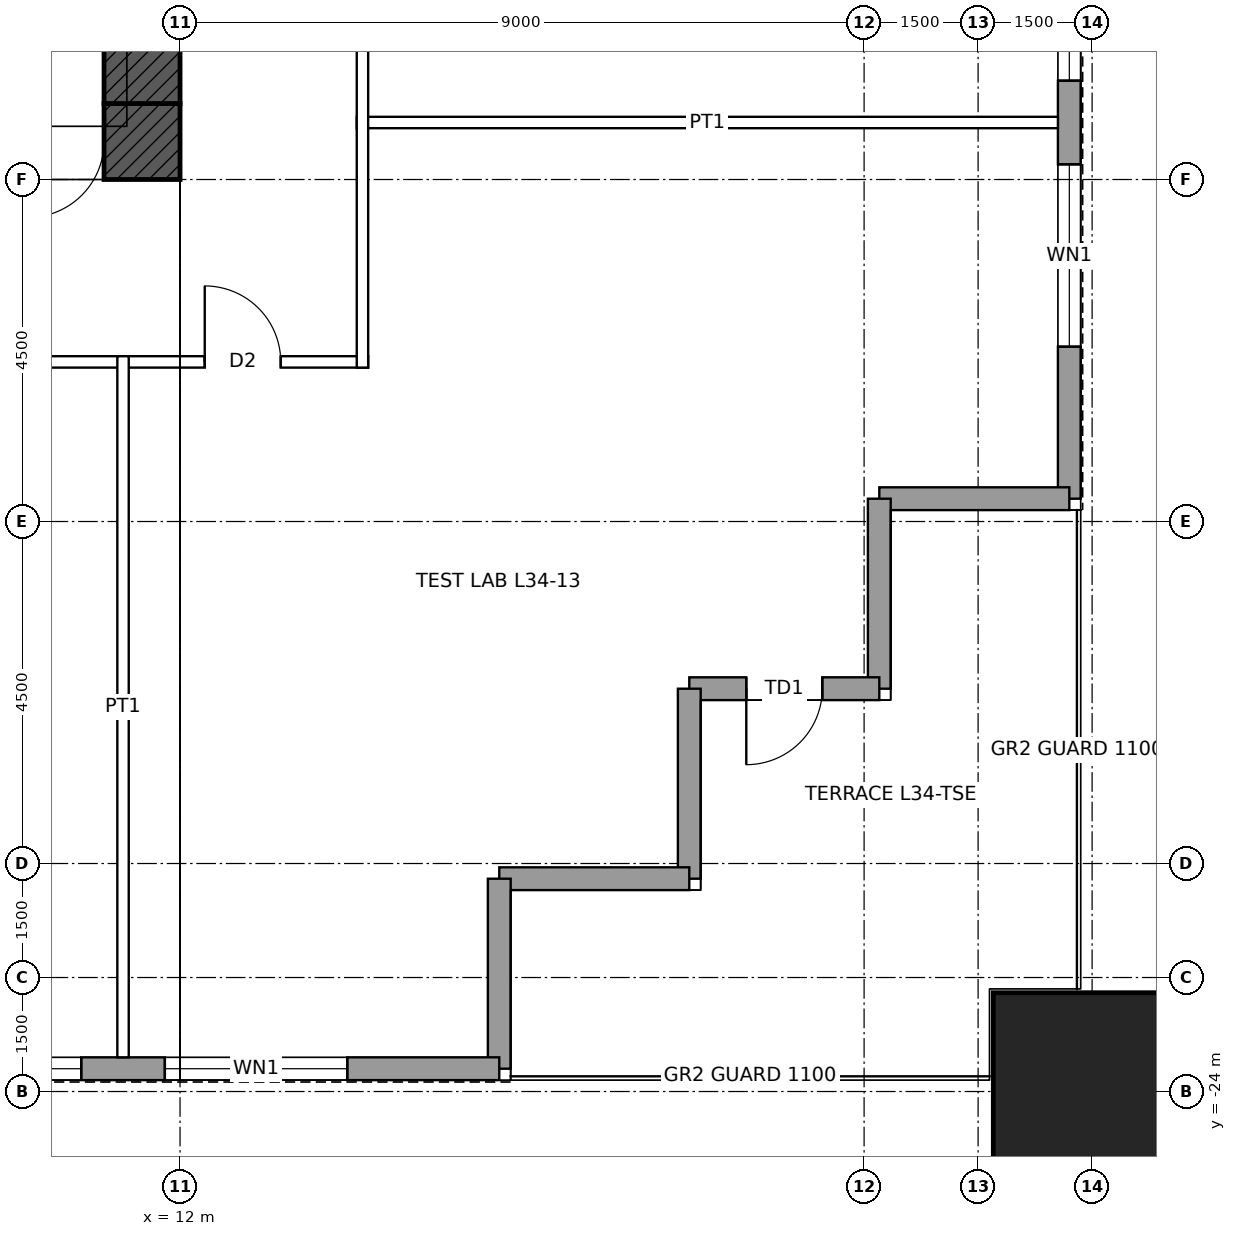
"""IFC4 building model, lengths in metres.
Left out: names, types, materials, properties, quantities, classifications, styles, units other than length and angle.
Written with IfcOpenShell. Run it as: python <this file> out.ifc"""

import sys

from ifc_helpers import new_model, si_unit, direction, frame, frame_2d, origin, origin_2d, place, context, subcontext, project, spatial, rectangle, hollow_rectangle, extrude, element, fill, save


model = new_model("IFC4")
c1 = context("Model", 3, precision=1e-05, world=origin(), true_north=direction((0.0, 1.0)))
c2 = subcontext(c1, "Body", "Model", "MODEL_VIEW")
j1 = project(units=[si_unit("LENGTHUNIT", "METRE"), si_unit("PLANEANGLEUNIT", "RADIAN")], contexts=[c1])
p1 = place(None, origin())
s1 = spatial("IfcSite", under=j1, at=p1, CompositionType="ELEMENT")
p2 = place(p1, origin())
s2 = spatial("IfcBuilding", under=s1, at=p2, CompositionType="ELEMENT")
p3 = place(p2, frame((0.0, 0.0, 167.4)))
s3 = spatial("IfcBuildingStorey", under=s2, at=p3, CompositionType="ELEMENT", Elevation=167.4)
p4 = place(p3, frame((24.0, -24.0, 0.0), z_axis=(0.0, 0.0, 1.0), x_axis=(1.0, 0.0, 0.0)))
e1 = element("IfcColumn", 1, at=p4, inside=s3, PredefinedType="COLUMN", context=c2, shape_type="SweptSolid", body=[
    extrude(hollow_rectangle(XDim=2.6, YDim=2.6, WallThickness=0.13, at=origin_2d()), origin(), (0.0, 0.0, 1.0), 4.5),
])
p5 = place(p3, frame((12.0, -11.5, 0.0), z_axis=(0.0, 0.0, 1.0), x_axis=(-1.0, 0.0, 0.0)))
e2 = element("IfcWall", 2, at=p5, inside=s3, PredefinedType="SHEAR", context=c2, shape_type="SweptSolid", body=[
    extrude(rectangle(XDim=24.0, YDim=1.0, at=frame_2d((12.0, 0.0))), origin(), (0.0, 0.0, 1.0), 4.5),
])
p6 = place(p5, frame((11.5, 0.0, 0.0)))
e3 = element("IfcOpeningElement", 3, at=p6, cuts=e2, PredefinedType="OPENING", context=c2, shape_type="SweptSolid", body=[
    extrude(rectangle(XDim=1.0, YDim=2.1, at=frame_2d((0.5, 1.05))), frame((0.0, 0.51, 0.0), z_axis=(0.0, -1.0, 0.0), x_axis=(1.0, 0.0, 0.0)), (0.0, 0.0, 1.0), 1.02),
])
p7 = place(p5, frame((1.0, 0.0, 0.0)))
e4 = element("IfcOpeningElement", 4, at=p7, cuts=e2, PredefinedType="OPENING", context=c2, shape_type="SweptSolid", body=[
    extrude(rectangle(XDim=1.0, YDim=2.4, at=frame_2d((0.5, 1.2))), frame((0.0, 0.51, 0.0), z_axis=(0.0, -1.0, 0.0), x_axis=(1.0, 0.0, 0.0)), (0.0, 0.0, 1.0), 1.02),
])
p8 = place(p3, frame((11.5, 11.0, 0.0), z_axis=(0.0, 0.0, 1.0), x_axis=(0.0, -1.0, 0.0)))
e5 = element("IfcWall", 5, at=p8, inside=s3, PredefinedType="SHEAR", context=c2, shape_type="SweptSolid", body=[
    extrude(rectangle(XDim=22.0, YDim=1.0, at=frame_2d((11.0, 0.0))), origin(), (0.0, 0.0, 1.0), 4.5),
])
p9 = place(p8, frame((10.5, 0.0, 0.0)))
e6 = element("IfcOpeningElement", 6, at=p9, cuts=e5, PredefinedType="OPENING", context=c2, shape_type="SweptSolid", body=[
    extrude(rectangle(XDim=1.0, YDim=2.4, at=frame_2d((0.5, 1.2))), frame((0.0, 0.51, 0.0), z_axis=(0.0, -1.0, 0.0), x_axis=(1.0, 0.0, 0.0)), (0.0, 0.0, 1.0), 1.02),
])
p10 = place(p3, frame((23.7, 16.2, 0.0), z_axis=(0.0, 0.0, 1.0), x_axis=(0.0, -1.0, 0.0)))
e7 = element("IfcWall", 7, at=p10, inside=s3, PredefinedType="SOLIDWALL", context=c2, shape_type="SweptSolid", body=[
    extrude(rectangle(XDim=32.4, YDim=0.3, at=frame_2d((16.2, 0.0))), origin(), (0.0, 0.0, 1.0), 4.25),
])
p11 = place(p10, frame((2.0, 0.0, 1.0)))
e8 = element("IfcOpeningElement", 8, at=p11, cuts=e7, PredefinedType="OPENING", context=c2, shape_type="SweptSolid", body=[
    extrude(rectangle(XDim=2.4, YDim=1.2, at=frame_2d((1.2, 0.6))), frame((0.0, 0.16, 0.0), z_axis=(0.0, -1.0, 0.0), x_axis=(1.0, 0.0, 0.0)), (0.0, 0.0, 1.0), 0.32),
])
p12 = place(p10, frame((5.5, 0.0, 1.0)))
e9 = element("IfcOpeningElement", 9, at=p12, cuts=e7, PredefinedType="OPENING", context=c2, shape_type="SweptSolid", body=[
    extrude(rectangle(XDim=2.4, YDim=1.2, at=frame_2d((1.2, 0.6))), frame((0.0, 0.16, 0.0), z_axis=(0.0, -1.0, 0.0), x_axis=(1.0, 0.0, 0.0)), (0.0, 0.0, 1.0), 0.32),
])
p13 = place(p10, frame((9.5, 0.0, 1.0)))
e10 = element("IfcOpeningElement", 10, at=p13, cuts=e7, PredefinedType="OPENING", context=c2, shape_type="SweptSolid", body=[
    extrude(rectangle(XDim=2.4, YDim=1.2, at=frame_2d((1.2, 0.6))), frame((0.0, 0.16, 0.0), z_axis=(0.0, -1.0, 0.0), x_axis=(1.0, 0.0, 0.0)), (0.0, 0.0, 1.0), 0.32),
])
p14 = place(p10, frame((13.0, 0.0, 1.0)))
e11 = element("IfcOpeningElement", 11, at=p14, cuts=e7, PredefinedType="OPENING", context=c2, shape_type="SweptSolid", body=[
    extrude(rectangle(XDim=2.4, YDim=1.2, at=frame_2d((1.2, 0.6))), frame((0.0, 0.16, 0.0), z_axis=(0.0, -1.0, 0.0), x_axis=(1.0, 0.0, 0.0)), (0.0, 0.0, 1.0), 0.32),
])
p15 = place(p10, frame((17.0, 0.0, 1.0)))
e12 = element("IfcOpeningElement", 12, at=p15, cuts=e7, PredefinedType="OPENING", context=c2, shape_type="SweptSolid", body=[
    extrude(rectangle(XDim=2.4, YDim=1.2, at=frame_2d((1.2, 0.6))), frame((0.0, 0.16, 0.0), z_axis=(0.0, -1.0, 0.0), x_axis=(1.0, 0.0, 0.0)), (0.0, 0.0, 1.0), 0.32),
])
p16 = place(p10, frame((20.5, 0.0, 1.0)))
e13 = element("IfcOpeningElement", 13, at=p16, cuts=e7, PredefinedType="OPENING", context=c2, shape_type="SweptSolid", body=[
    extrude(rectangle(XDim=2.4, YDim=1.2, at=frame_2d((1.2, 0.6))), frame((0.0, 0.16, 0.0), z_axis=(0.0, -1.0, 0.0), x_axis=(1.0, 0.0, 0.0)), (0.0, 0.0, 1.0), 0.32),
])
p17 = place(p10, frame((24.5, 0.0, 1.0)))
e14 = element("IfcOpeningElement", 14, at=p17, cuts=e7, PredefinedType="OPENING", context=c2, shape_type="SweptSolid", body=[
    extrude(rectangle(XDim=2.4, YDim=1.2, at=frame_2d((1.2, 0.6))), frame((0.0, 0.16, 0.0), z_axis=(0.0, -1.0, 0.0), x_axis=(1.0, 0.0, 0.0)), (0.0, 0.0, 1.0), 0.32),
])
p18 = place(p10, frame((28.0, 0.0, 1.0)))
e15 = element("IfcOpeningElement", 15, at=p18, cuts=e7, PredefinedType="OPENING", context=c2, shape_type="SweptSolid", body=[
    extrude(rectangle(XDim=2.4, YDim=1.2, at=frame_2d((1.2, 0.6))), frame((0.0, 0.16, 0.0), z_axis=(0.0, -1.0, 0.0), x_axis=(1.0, 0.0, 0.0)), (0.0, 0.0, 1.0), 0.32),
])
for number, where, z_axis, x_axis in (
    (16, (23.7, -16.2, 0.0), (0.0, 0.0, 1.0), (-1.0, 0.0, 0.0)),
    (17, (21.2, -16.2, 0.0), (0.0, 0.0, 1.0), (0.0, -1.0, 0.0)),
):
    element("IfcWall", number, at=place(p3, frame(where, z_axis=z_axis, x_axis=x_axis)), inside=s3, PredefinedType="SOLIDWALL", context=c2, shape_type="SweptSolid", body=[
        extrude(rectangle(XDim=2.5, YDim=0.3, at=frame_2d((1.25, 0.0))), origin(), (0.0, 0.0, 1.0), 4.25),
    ])
p19 = place(p3, frame((21.2, -18.7, 0.0), z_axis=(0.0, 0.0, 1.0), x_axis=(-1.0, 0.0, 0.0)))
e18 = element("IfcWall", 18, at=p19, inside=s3, PredefinedType="SOLIDWALL", context=c2, shape_type="SweptSolid", body=[
    extrude(rectangle(XDim=2.5, YDim=0.3, at=frame_2d((1.25, 0.0))), origin(), (0.0, 0.0, 1.0), 4.25),
])
p20 = place(p19, frame((0.75, 0.0, 0.0)))
e19 = element("IfcOpeningElement", 19, at=p20, cuts=e18, PredefinedType="OPENING", context=c2, shape_type="SweptSolid", body=[
    extrude(rectangle(XDim=1.0, YDim=2.4, at=frame_2d((0.5, 1.2))), frame((0.0, 0.16, 0.0), z_axis=(0.0, -1.0, 0.0), x_axis=(1.0, 0.0, 0.0)), (0.0, 0.0, 1.0), 0.32),
])
for number, where, z_axis, x_axis in (
    (20, (18.7, -18.7, 0.0), (0.0, 0.0, 1.0), (0.0, -1.0, 0.0)),
    (21, (18.7, -21.2, 0.0), (0.0, 0.0, 1.0), (-1.0, 0.0, 0.0)),
    (22, (16.2, -21.2, 0.0), (0.0, 0.0, 1.0), (0.0, -1.0, 0.0)),
):
    element("IfcWall", number, at=place(p3, frame(where, z_axis=z_axis, x_axis=x_axis)), inside=s3, PredefinedType="SOLIDWALL", context=c2, shape_type="SweptSolid", body=[
        extrude(rectangle(XDim=2.5, YDim=0.3, at=frame_2d((1.25, 0.0))), origin(), (0.0, 0.0, 1.0), 4.25),
    ])
p21 = place(p3, frame((16.2, -23.7, 0.0), z_axis=(0.0, 0.0, 1.0), x_axis=(-1.0, 0.0, 0.0)))
e23 = element("IfcWall", 23, at=p21, inside=s3, PredefinedType="SOLIDWALL", context=c2, shape_type="SweptSolid", body=[
    extrude(rectangle(XDim=32.4, YDim=0.3, at=frame_2d((16.2, 0.0))), origin(), (0.0, 0.0, 1.0), 4.25),
])
p22 = place(p21, frame((2.0, 0.0, 1.0)))
e24 = element("IfcOpeningElement", 24, at=p22, cuts=e23, PredefinedType="OPENING", context=c2, shape_type="SweptSolid", body=[
    extrude(rectangle(XDim=2.4, YDim=1.2, at=frame_2d((1.2, 0.6))), frame((0.0, 0.16, 0.0), z_axis=(0.0, -1.0, 0.0), x_axis=(1.0, 0.0, 0.0)), (0.0, 0.0, 1.0), 0.32),
])
p23 = place(p21, frame((5.5, 0.0, 1.0)))
e25 = element("IfcOpeningElement", 25, at=p23, cuts=e23, PredefinedType="OPENING", context=c2, shape_type="SweptSolid", body=[
    extrude(rectangle(XDim=2.4, YDim=1.2, at=frame_2d((1.2, 0.6))), frame((0.0, 0.16, 0.0), z_axis=(0.0, -1.0, 0.0), x_axis=(1.0, 0.0, 0.0)), (0.0, 0.0, 1.0), 0.32),
])
p24 = place(p21, frame((9.5, 0.0, 1.0)))
e26 = element("IfcOpeningElement", 26, at=p24, cuts=e23, PredefinedType="OPENING", context=c2, shape_type="SweptSolid", body=[
    extrude(rectangle(XDim=2.4, YDim=1.2, at=frame_2d((1.2, 0.6))), frame((0.0, 0.16, 0.0), z_axis=(0.0, -1.0, 0.0), x_axis=(1.0, 0.0, 0.0)), (0.0, 0.0, 1.0), 0.32),
])
p25 = place(p21, frame((13.0, 0.0, 1.0)))
e27 = element("IfcOpeningElement", 27, at=p25, cuts=e23, PredefinedType="OPENING", context=c2, shape_type="SweptSolid", body=[
    extrude(rectangle(XDim=2.4, YDim=1.2, at=frame_2d((1.2, 0.6))), frame((0.0, 0.16, 0.0), z_axis=(0.0, -1.0, 0.0), x_axis=(1.0, 0.0, 0.0)), (0.0, 0.0, 1.0), 0.32),
])
p26 = place(p21, frame((17.0, 0.0, 1.0)))
e28 = element("IfcOpeningElement", 28, at=p26, cuts=e23, PredefinedType="OPENING", context=c2, shape_type="SweptSolid", body=[
    extrude(rectangle(XDim=2.4, YDim=1.2, at=frame_2d((1.2, 0.6))), frame((0.0, 0.16, 0.0), z_axis=(0.0, -1.0, 0.0), x_axis=(1.0, 0.0, 0.0)), (0.0, 0.0, 1.0), 0.32),
])
p27 = place(p21, frame((20.5, 0.0, 1.0)))
e29 = element("IfcOpeningElement", 29, at=p27, cuts=e23, PredefinedType="OPENING", context=c2, shape_type="SweptSolid", body=[
    extrude(rectangle(XDim=2.4, YDim=1.2, at=frame_2d((1.2, 0.6))), frame((0.0, 0.16, 0.0), z_axis=(0.0, -1.0, 0.0), x_axis=(1.0, 0.0, 0.0)), (0.0, 0.0, 1.0), 0.32),
])
p28 = place(p21, frame((24.5, 0.0, 1.0)))
e30 = element("IfcOpeningElement", 30, at=p28, cuts=e23, PredefinedType="OPENING", context=c2, shape_type="SweptSolid", body=[
    extrude(rectangle(XDim=2.4, YDim=1.2, at=frame_2d((1.2, 0.6))), frame((0.0, 0.16, 0.0), z_axis=(0.0, -1.0, 0.0), x_axis=(1.0, 0.0, 0.0)), (0.0, 0.0, 1.0), 0.32),
])
p29 = place(p21, frame((28.0, 0.0, 1.0)))
e31 = element("IfcOpeningElement", 31, at=p29, cuts=e23, PredefinedType="OPENING", context=c2, shape_type="SweptSolid", body=[
    extrude(rectangle(XDim=2.4, YDim=1.2, at=frame_2d((1.2, 0.6))), frame((0.0, 0.16, 0.0), z_axis=(0.0, -1.0, 0.0), x_axis=(1.0, 0.0, 0.0)), (0.0, 0.0, 1.0), 0.32),
])
p30 = place(p3, frame((-14.475, -14.4, 0.0), z_axis=(0.0, 0.0, 1.0), x_axis=(1.0, 0.0, 0.0)))
e32 = element("IfcWall", 32, at=p30, inside=s3, PredefinedType="PARTITIONING", context=c2, shape_type="SweptSolid", body=[
    extrude(rectangle(XDim=28.95, YDim=0.15, at=frame_2d((14.475, 0.0))), origin(), (0.0, 0.0, 1.0), 4.25),
])
p31 = place(p30, frame((21.075, 0.0, 0.0)))
e33 = element("IfcOpeningElement", 33, at=p31, cuts=e32, PredefinedType="OPENING", context=c2, shape_type="SweptSolid", body=[
    extrude(rectangle(XDim=1.8, YDim=2.4, at=frame_2d((0.9, 1.2))), frame((0.0, 0.085, 0.0), z_axis=(0.0, -1.0, 0.0), x_axis=(1.0, 0.0, 0.0)), (0.0, 0.0, 1.0), 0.17),
])
p32 = place(p30, frame((9.825, 0.0, 0.0)))
e34 = element("IfcOpeningElement", 34, at=p32, cuts=e32, PredefinedType="OPENING", context=c2, shape_type="SweptSolid", body=[
    extrude(rectangle(XDim=1.8, YDim=2.4, at=frame_2d((0.9, 1.2))), frame((0.0, 0.085, 0.0), z_axis=(0.0, -1.0, 0.0), x_axis=(1.0, 0.0, 0.0)), (0.0, 0.0, 1.0), 0.17),
])
p33 = place(p30, frame((26.8, 0.0, 0.0)))
e35 = element("IfcOpeningElement", 35, at=p33, cuts=e32, PredefinedType="OPENING", context=c2, shape_type="SweptSolid", body=[
    extrude(rectangle(XDim=1.0, YDim=2.1, at=frame_2d((0.5, 1.05))), frame((0.0, 0.085, 0.0), z_axis=(0.0, -1.0, 0.0), x_axis=(1.0, 0.0, 0.0)), (0.0, 0.0, 1.0), 0.17),
])
p34 = place(p30, frame((1.15, 0.0, 0.0)))
e36 = element("IfcOpeningElement", 36, at=p34, cuts=e32, PredefinedType="OPENING", context=c2, shape_type="SweptSolid", body=[
    extrude(rectangle(XDim=1.0, YDim=2.1, at=frame_2d((0.5, 1.05))), frame((0.0, 0.085, 0.0), z_axis=(0.0, -1.0, 0.0), x_axis=(1.0, 0.0, 0.0)), (0.0, 0.0, 1.0), 0.17),
])
for number, where, z_axis, x_axis in (
    (37, (14.325, -11.25, 0.0), (0.0, 0.0, 1.0), (1.0, 0.0, 0.0)),
    (38, (11.25, -23.55, 0.0), (0.0, 0.0, 1.0), (0.0, 1.0, 0.0)),
):
    element("IfcWall", number, at=place(p3, frame(where, z_axis=z_axis, x_axis=x_axis)), inside=s3, PredefinedType="PARTITIONING", context=c2, shape_type="SweptSolid", body=[
        extrude(rectangle(XDim=9.225, YDim=0.15, at=frame_2d((4.613, 0.0))), origin(), (0.0, 0.0, 1.0), 3.409),
    ])
p35 = place(p3, frame((14.4, -14.475, 0.0), z_axis=(0.0, 0.0, 1.0), x_axis=(0.0, 1.0, 0.0)))
e39 = element("IfcWall", 39, at=p35, inside=s3, PredefinedType="PARTITIONING", context=c2, shape_type="SweptSolid", body=[
    extrude(rectangle(XDim=28.95, YDim=0.15, at=frame_2d((14.475, 0.0))), origin(), (0.0, 0.0, 1.0), 4.25),
])
p36 = place(p35, frame((21.075, 0.0, 0.0)))
e40 = element("IfcOpeningElement", 40, at=p36, cuts=e39, PredefinedType="OPENING", context=c2, shape_type="SweptSolid", body=[
    extrude(rectangle(XDim=1.8, YDim=2.4, at=frame_2d((0.9, 1.2))), frame((0.0, 0.085, 0.0), z_axis=(0.0, -1.0, 0.0), x_axis=(1.0, 0.0, 0.0)), (0.0, 0.0, 1.0), 0.17),
])
p37 = place(p35, frame((9.825, 0.0, 0.0)))
e41 = element("IfcOpeningElement", 41, at=p37, cuts=e39, PredefinedType="OPENING", context=c2, shape_type="SweptSolid", body=[
    extrude(rectangle(XDim=1.8, YDim=2.4, at=frame_2d((0.9, 1.2))), frame((0.0, 0.085, 0.0), z_axis=(0.0, -1.0, 0.0), x_axis=(1.0, 0.0, 0.0)), (0.0, 0.0, 1.0), 0.17),
])
p38 = place(p17, origin())
e42 = element("IfcWindow", 42, at=p38, inside=s3, PartitioningType="SINGLE_PANEL", PredefinedType="WINDOW", context=c2, shape_type="SweptSolid", body=[
    extrude(rectangle(XDim=2.4, YDim=1.2, at=frame_2d((1.2, 0.6))), frame((0.0, 0.03, 0.0), z_axis=(0.0, -1.0, 0.0), x_axis=(1.0, 0.0, 0.0)), (0.0, 0.0, 1.0), 0.06),
])
fill(e14, e42)
p39 = place(p18, origin())
e43 = element("IfcWindow", 43, at=p39, inside=s3, PartitioningType="SINGLE_PANEL", PredefinedType="WINDOW", context=c2, shape_type="SweptSolid", body=[
    extrude(rectangle(XDim=2.4, YDim=1.2, at=frame_2d((1.2, 0.6))), frame((0.0, 0.03, 0.0), z_axis=(0.0, -1.0, 0.0), x_axis=(1.0, 0.0, 0.0)), (0.0, 0.0, 1.0), 0.06),
])
fill(e15, e43)
p40 = place(p20, origin())
e44 = element("IfcDoor", 44, at=p40, inside=s3, OperationType="SINGLE_SWING_RIGHT", PredefinedType="DOOR", context=c2, shape_type="SweptSolid", body=[
    extrude(rectangle(XDim=1.0, YDim=2.4, at=frame_2d((0.5, 1.2))), frame((0.0, 0.025, 0.0), z_axis=(0.0, -1.0, 0.0), x_axis=(1.0, 0.0, 0.0)), (0.0, 0.0, 1.0), 0.05),
])
fill(e19, e44)
p41 = place(p22, origin())
e45 = element("IfcWindow", 45, at=p41, inside=s3, PartitioningType="SINGLE_PANEL", PredefinedType="WINDOW", context=c2, shape_type="SweptSolid", body=[
    extrude(rectangle(XDim=2.4, YDim=1.2, at=frame_2d((1.2, 0.6))), frame((0.0, 0.03, 0.0), z_axis=(0.0, -1.0, 0.0), x_axis=(1.0, 0.0, 0.0)), (0.0, 0.0, 1.0), 0.06),
])
fill(e24, e45)
p42 = place(p23, origin())
e46 = element("IfcWindow", 46, at=p42, inside=s3, PartitioningType="SINGLE_PANEL", PredefinedType="WINDOW", context=c2, shape_type="SweptSolid", body=[
    extrude(rectangle(XDim=2.4, YDim=1.2, at=frame_2d((1.2, 0.6))), frame((0.0, 0.03, 0.0), z_axis=(0.0, -1.0, 0.0), x_axis=(1.0, 0.0, 0.0)), (0.0, 0.0, 1.0), 0.06),
])
fill(e25, e46)
p43 = place(p7, origin())
e47 = element("IfcDoor", 47, at=p43, inside=s3, OperationType="SINGLE_SWING_RIGHT", PredefinedType="DOOR", context=c2, shape_type="SweptSolid", body=[
    extrude(rectangle(XDim=1.0, YDim=2.4, at=frame_2d((0.5, 1.2))), frame((0.0, 0.485, 0.0), z_axis=(0.0, -1.0, 0.0), x_axis=(1.0, 0.0, 0.0)), (0.0, 0.0, 1.0), 0.05),
])
fill(e4, e47)
p44 = place(p33, origin())
e48 = element("IfcDoor", 48, at=p44, inside=s3, OperationType="SINGLE_SWING_LEFT", PredefinedType="DOOR", context=c2, shape_type="SweptSolid", body=[
    extrude(rectangle(XDim=1.0, YDim=2.1, at=frame_2d((0.5, 1.05))), frame((0.0, 0.025, 0.0), z_axis=(0.0, -1.0, 0.0), x_axis=(1.0, 0.0, 0.0)), (0.0, 0.0, 1.0), 0.05),
])
fill(e35, e48)
save(model, sys.argv[1])
